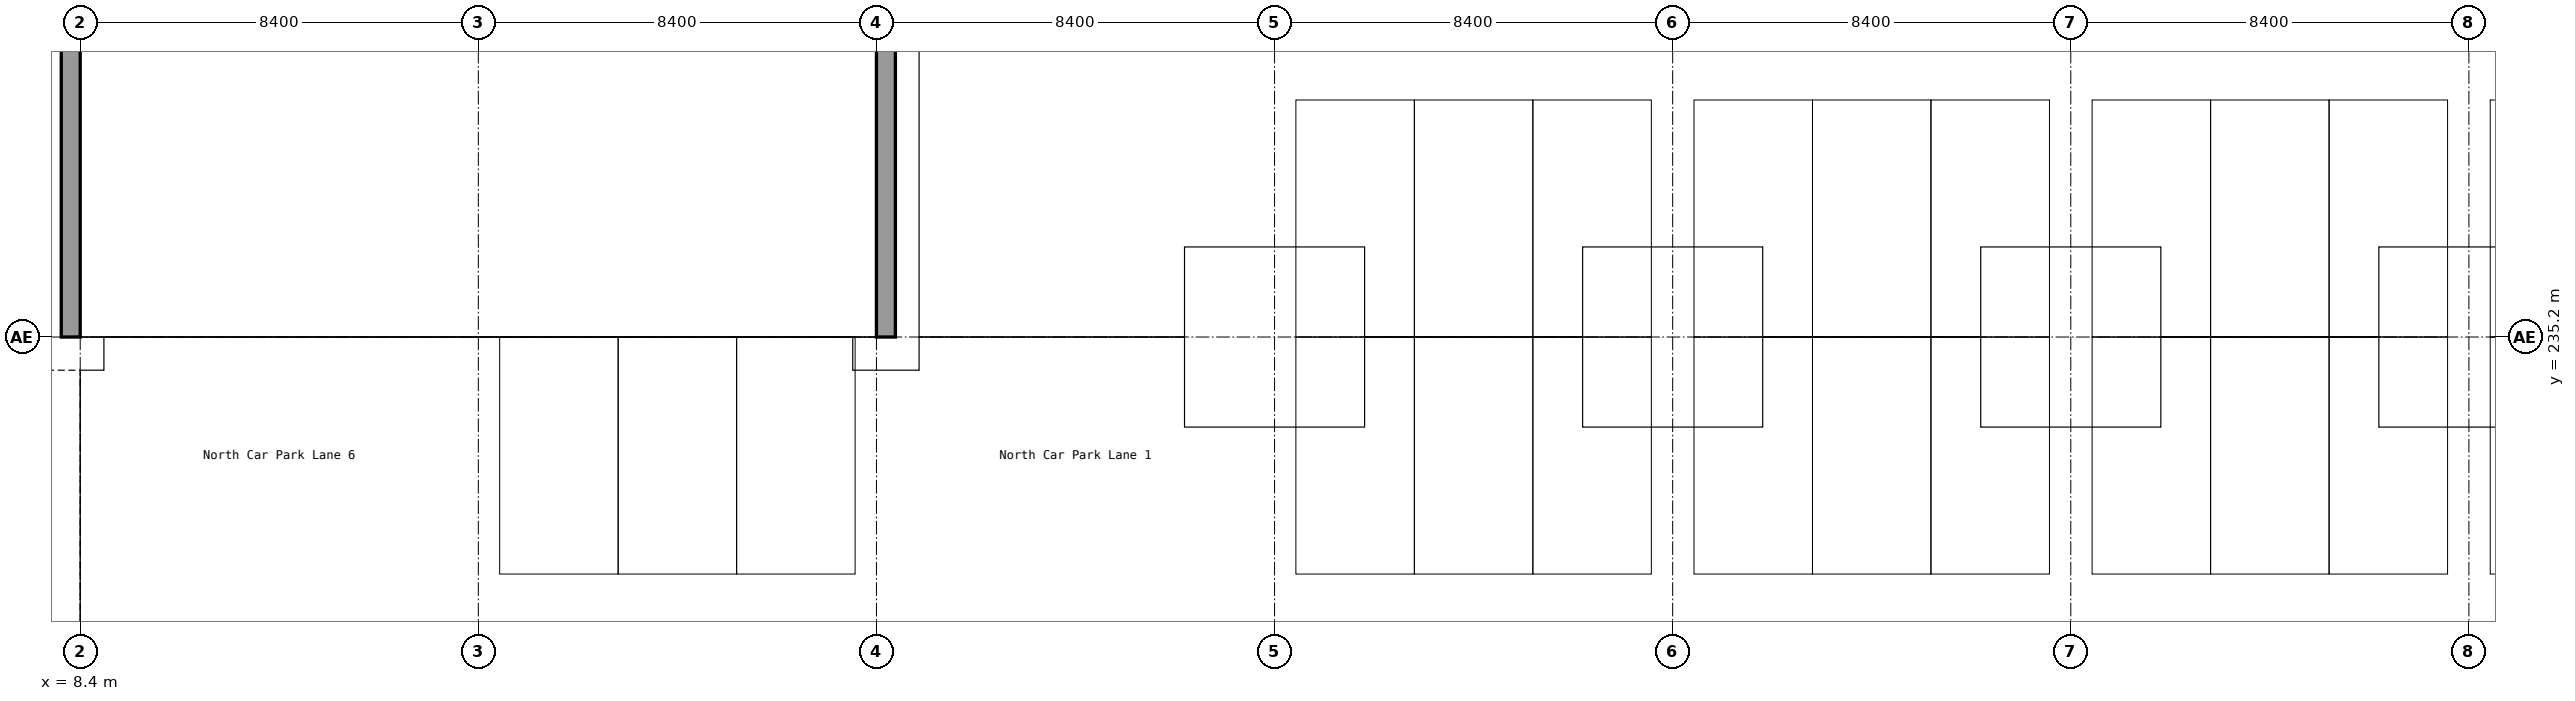
"""IFC4 building model, lengths in metres.
Left out: names, types, materials, properties, quantities, classifications, styles, units other than length and angle.
Written with IfcOpenShell. Run it as: python <this file> out.ifc"""

import sys

from ifc_helpers import new_model, si_unit, direction, frame, origin, origin_2d, place, context, subcontext, project, spatial, polyline, rectangle, outline, extrude, element, save


model = new_model("IFC4")
c1 = context("Model", 3, precision=1e-05, world=origin(), true_north=direction((0.0, 1.0)))
c2 = subcontext(c1, "Body", "Model", "MODEL_VIEW")
j1 = project(units=[si_unit("LENGTHUNIT", "METRE"), si_unit("PLANEANGLEUNIT", "RADIAN")], contexts=[c1])
p1 = place(None, origin())
s1 = spatial("IfcSite", under=j1, at=p1, CompositionType="ELEMENT")
p2 = place(p1, origin())
s2 = spatial("IfcBuilding", under=s1, at=p2, CompositionType="ELEMENT")
p3 = place(p2, frame((0.0, 0.0, -3.0)))
s3 = spatial("IfcBuildingStorey", under=s2, at=p3, CompositionType="ELEMENT", Elevation=-3.0)
for number, where, z_axis, x_axis in (
    (1, (33.6, 235.2, 0.0), (0.0, 0.0, 1.0), (1.0, 0.0, 0.0)),
    (2, (42.0, 235.2, 0.0), (0.0, 0.0, 1.0), (1.0, 0.0, 0.0)),
    (3, (50.4, 235.2, 0.0), (0.0, 0.0, 1.0), (1.0, 0.0, 0.0)),
    (4, (58.8, 235.2, 0.0), (0.0, 0.0, 1.0), (1.0, 0.0, 0.0)),
):
    element("IfcColumn", number, at=place(p3, frame(where, z_axis=z_axis, x_axis=x_axis)), inside=s3, PredefinedType="COLUMN", context=c2, shape_type="SweptSolid", body=[
        extrude(rectangle(XDim=0.8, YDim=0.8, at=origin_2d()), origin(), (0.0, 0.0, 1.0), 2.4),
    ])
for number, where, z_axis, x_axis in (
    (5, (8.2, 268.8, 0.0), (0.0, 0.0, 1.0), (0.0, -1.0, 0.0)),
    (6, (25.4, 268.8, 0.0), (0.0, 0.0, 1.0), (0.0, -1.0, 0.0)),
):
    element("IfcWall", number, at=place(p3, frame(where, z_axis=z_axis, x_axis=x_axis)), inside=s3, PredefinedType="SOLIDWALL", context=c2, shape_type="SweptSolid", body=[
        extrude(outline(polyline([(0.0, 0.0), (33.6, 0.0), (33.6, 4.1), (0.0, 1.1), (0.0, 0.0)])), frame((0.0, 0.2, 0.0), z_axis=(0.0, -1.0, 0.0), x_axis=(1.0, 0.0, 0.0)), (0.0, 0.0, 1.0), 0.4),
    ])
save(model, sys.argv[1])
